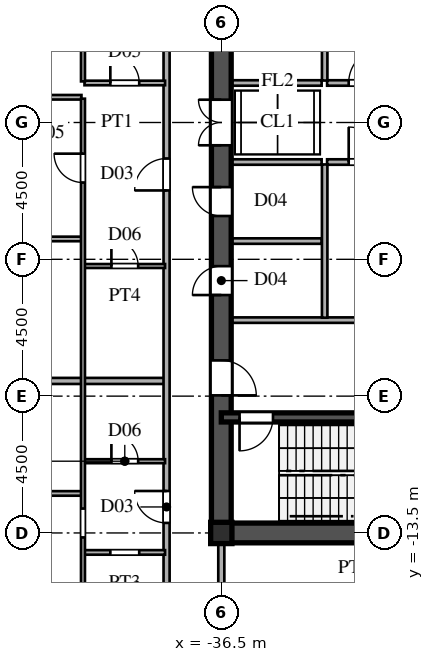
"""IFC4 building model, lengths in metres.
Left out: names, types, materials, properties, quantities, classifications, styles, units other than length and angle.
Written with IfcOpenShell. Run it as: python <this file> out.ifc"""

import sys

from ifc_helpers import new_model, si_unit, direction, frame, frame_2d, origin, origin_2d, place, context, subcontext, project, spatial, rectangle, i_section, extrude, source, transform, mapped, element, fill, save


model = new_model("IFC4")
c1 = context("Model", 3, precision=1e-05, world=origin(), true_north=direction((0.0, 1.0)))
c2 = subcontext(c1, "Body", "Model", "MODEL_VIEW")
j1 = project(units=[si_unit("LENGTHUNIT", "METRE"), si_unit("PLANEANGLEUNIT", "RADIAN")], contexts=[c1])
p1 = place(None, origin())
s1 = spatial("IfcSite", under=j1, at=p1, CompositionType="ELEMENT")
p2 = place(p1, origin())
s2 = spatial("IfcBuilding", under=s1, at=p2, CompositionType="ELEMENT")
p3 = place(p2, frame((0.0, 0.0, 114.0)))
s3 = spatial("IfcBuildingStorey", under=s2, at=p3, CompositionType="ELEMENT", Elevation=114.0)
m1 = source(origin(), c2, "Body", "SweptSolid", [
    extrude(i_section(OverallWidth=0.7, OverallDepth=0.7, WebThickness=0.028, FlangeThickness=0.045, at=origin_2d()), origin(), (0.0, 0.0, 1.0), 3.6),
])
p4 = place(p3, frame((-36.5, -13.5, 0.0), z_axis=(0.0, 0.0, 1.0), x_axis=(1.0, 0.0, 0.0)))
e1 = element("IfcColumn", 1, at=p4, inside=s3, PredefinedType="COLUMN", context=c2, shape_type="MappedRepresentation", body=[
    mapped(m1, transform((0.0, 0.0, 0.0), scale=1.0)),
])
p5 = place(p3, frame((-36.5, -13.5, 0.0), z_axis=(0.0, 0.0, 1.0), x_axis=(1.0, 0.0, 0.0)))
e2 = element("IfcWall", 2, at=p5, inside=s3, PredefinedType="SHEAR", context=c2, shape_type="SweptSolid", body=[
    extrude(rectangle(XDim=9.0, YDim=0.65, at=frame_2d((4.5, 0.0))), origin(), (0.0, 0.0, 1.0), 3.38),
])
p6 = place(p3, frame((-36.5, -13.65, 0.0), z_axis=(0.0, 0.0, 1.0), x_axis=(0.0, 1.0, 0.0)))
e3 = element("IfcWall", 3, at=p6, inside=s3, PredefinedType="SHEAR", context=c2, shape_type="SweptSolid", body=[
    extrude(rectangle(XDim=7.15, YDim=0.65, at=frame_2d((3.575, 0.0))), origin(), (0.0, 0.0, 1.0), 3.38),
])
p7 = place(p6, frame((4.675, 0.0, 0.0)))
e4 = element("IfcOpeningElement", 4, at=p7, cuts=e3, PredefinedType="OPENING", context=c2, shape_type="SweptSolid", body=[
    extrude(rectangle(XDim=1.15, YDim=2.2, at=frame_2d((0.575, 1.1))), frame((0.0, 0.335, 0.0), z_axis=(0.0, -1.0, 0.0), x_axis=(1.0, 0.0, 0.0)), (0.0, 0.0, 1.0), 0.67),
])
p8 = place(p3, frame((-36.5, -1.3, 0.0), z_axis=(0.0, 0.0, 1.0), x_axis=(0.0, 1.0, 0.0)))
e5 = element("IfcWall", 5, at=p8, inside=s3, PredefinedType="SHEAR", context=c2, shape_type="SweptSolid", body=[
    extrude(rectangle(XDim=2.6, YDim=0.65, at=frame_2d((1.3, 0.0))), origin(), (0.0, 0.0, 1.0), 3.38),
])
p9 = place(p8, frame((0.55, 0.0, 0.0)))
e6 = element("IfcOpeningElement", 6, at=p9, cuts=e5, PredefinedType="OPENING", context=c2, shape_type="SweptSolid", body=[
    extrude(rectangle(XDim=1.5, YDim=2.3, at=frame_2d((0.75, 1.15))), frame((0.0, 0.335, 0.0), z_axis=(0.0, -1.0, 0.0), x_axis=(1.0, 0.0, 0.0)), (0.0, 0.0, 1.0), 0.67),
])
p10 = place(p3, frame((-36.5, -6.5, 0.0), z_axis=(0.0, 0.0, 1.0), x_axis=(0.0, 1.0, 0.0)))
e7 = element("IfcWall", 7, at=p10, inside=s3, PredefinedType="SHEAR", context=c2, shape_type="SweptSolid", body=[
    extrude(rectangle(XDim=2.6, YDim=0.65, at=frame_2d((1.3, 0.0))), origin(), (0.0, 0.0, 1.0), 3.38),
])
p11 = place(p10, frame((0.825, 0.0, 0.0)))
e8 = element("IfcOpeningElement", 8, at=p11, cuts=e7, PredefinedType="OPENING", context=c2, shape_type="SweptSolid", body=[
    extrude(rectangle(XDim=0.95, YDim=2.15, at=frame_2d((0.475, 1.075))), frame((0.0, 0.335, 0.0), z_axis=(0.0, -1.0, 0.0), x_axis=(1.0, 0.0, 0.0)), (0.0, 0.0, 1.0), 0.67),
])
p12 = place(p3, frame((-36.5, -3.9, 0.0), z_axis=(0.0, 0.0, 1.0), x_axis=(0.0, 1.0, 0.0)))
e9 = element("IfcWall", 9, at=p12, inside=s3, PredefinedType="SHEAR", context=c2, shape_type="SweptSolid", body=[
    extrude(rectangle(XDim=2.6, YDim=0.65, at=frame_2d((1.3, 0.0))), origin(), (0.0, 0.0, 1.0), 3.38),
])
p13 = place(p12, frame((0.825, 0.0, 0.0)))
e10 = element("IfcOpeningElement", 10, at=p13, cuts=e9, PredefinedType="OPENING", context=c2, shape_type="SweptSolid", body=[
    extrude(rectangle(XDim=0.95, YDim=2.15, at=frame_2d((0.475, 1.075))), frame((0.0, 0.335, 0.0), z_axis=(0.0, -1.0, 0.0), x_axis=(1.0, 0.0, 0.0)), (0.0, 0.0, 1.0), 0.67),
])
p14 = place(p3, frame((-36.5, 1.3, 0.0), z_axis=(0.0, 0.0, 1.0), x_axis=(0.0, 1.0, 0.0)))
e11 = element("IfcWall", 11, at=p14, inside=s3, PredefinedType="SHEAR", context=c2, shape_type="SweptSolid", body=[
    extrude(rectangle(XDim=3.45, YDim=0.65, at=frame_2d((1.725, 0.0))), origin(), (0.0, 0.0, 1.0), 3.38),
])
p15 = place(p14, frame((1.25, 0.0, 0.0)))
e12 = element("IfcOpeningElement", 12, at=p15, cuts=e11, PredefinedType="OPENING", context=c2, shape_type="SweptSolid", body=[
    extrude(rectangle(XDim=0.95, YDim=2.15, at=frame_2d((0.475, 1.075))), frame((0.0, 0.335, 0.0), z_axis=(0.0, -1.0, 0.0), x_axis=(1.0, 0.0, 0.0)), (0.0, 0.0, 1.0), 0.67),
])
p16 = place(p3, frame((-36.5, -9.7, 0.0), z_axis=(0.0, 0.0, 1.0), x_axis=(1.0, 0.0, 0.0)))
e13 = element("IfcWall", 13, at=p16, inside=s3, PredefinedType="SHEAR", context=c2, shape_type="SweptSolid", body=[
    extrude(rectangle(XDim=9.0, YDim=0.3, at=frame_2d((4.5, 0.0))), origin(), (0.0, 0.0, 1.0), 3.38),
])
p17 = place(p16, frame((0.6, 0.0, 0.0)))
e14 = element("IfcOpeningElement", 14, at=p17, cuts=e13, PredefinedType="OPENING", context=c2, shape_type="SweptSolid", body=[
    extrude(rectangle(XDim=1.1, YDim=2.2, at=frame_2d((0.55, 1.1))), frame((0.0, 0.16, 0.0), z_axis=(0.0, -1.0, 0.0), x_axis=(1.0, 0.0, 0.0)), (0.0, 0.0, 1.0), 0.32),
])
p18 = place(p3, frame((-36.15, -6.5, 0.0), z_axis=(0.0, 0.0, 1.0), x_axis=(1.0, 0.0, 0.0)))
e15 = element("IfcWall", 15, at=p18, inside=s3, PredefinedType="PARTITIONING", context=c2, shape_type="SweptSolid", body=[
    extrude(rectangle(XDim=5.7, YDim=0.18, at=frame_2d((2.85, 0.0))), origin(), (0.0, 0.0, 1.0), 3.38),
])
p19 = place(p3, frame((-33.1, -6.42, 0.0), z_axis=(0.0, 0.0, 1.0), x_axis=(0.0, 1.0, 0.0)))
e16 = element("IfcWall", 16, at=p19, inside=s3, PredefinedType="PARTITIONING", context=c2, shape_type="SweptSolid", body=[
    extrude(rectangle(XDim=5.04, YDim=0.18, at=frame_2d((2.52, 0.0))), origin(), (0.0, 0.0, 1.0), 3.38),
])
p20 = place(p3, frame((-33.1, 1.38, 0.0), z_axis=(0.0, 0.0, 1.0), x_axis=(0.0, 1.0, 0.0)))
e17 = element("IfcWall", 17, at=p20, inside=s3, PredefinedType="PARTITIONING", context=c2, shape_type="SweptSolid", body=[
    extrude(rectangle(XDim=6.74, YDim=0.18, at=frame_2d((3.37, 0.0))), origin(), (0.0, 0.0, 1.0), 3.38),
])
p21 = place(p3, frame((-33.02, -1.3, 0.0), z_axis=(0.0, 0.0, 1.0), x_axis=(1.0, 0.0, 0.0)))
e18 = element("IfcWall", 18, at=p21, inside=s3, PredefinedType="PARTITIONING", context=c2, shape_type="SweptSolid", body=[
    extrude(rectangle(XDim=2.57, YDim=0.18, at=frame_2d((1.285, 0.0))), origin(), (0.0, 0.0, 1.0), 3.38),
])
p22 = place(p21, frame((0.71, 0.0, 0.0)))
e19 = element("IfcOpeningElement", 19, at=p22, cuts=e18, PredefinedType="OPENING", context=c2, shape_type="SweptSolid", body=[
    extrude(rectangle(XDim=1.15, YDim=2.2, at=frame_2d((0.575, 1.1))), frame((0.0, 0.1, 0.0), z_axis=(0.0, -1.0, 0.0), x_axis=(1.0, 0.0, 0.0)), (0.0, 0.0, 1.0), 0.2),
])
p23 = place(p3, frame((-33.02, 1.3, 0.0), z_axis=(0.0, 0.0, 1.0), x_axis=(1.0, 0.0, 0.0)))
e20 = element("IfcWall", 20, at=p23, inside=s3, PredefinedType="PARTITIONING", context=c2, shape_type="SweptSolid", body=[
    extrude(rectangle(XDim=2.57, YDim=0.18, at=frame_2d((1.285, 0.0))), origin(), (0.0, 0.0, 1.0), 3.38),
])
p24 = place(p23, frame((0.71, 0.0, 0.0)))
e21 = element("IfcOpeningElement", 21, at=p24, cuts=e20, PredefinedType="OPENING", context=c2, shape_type="SweptSolid", body=[
    extrude(rectangle(XDim=1.15, YDim=2.2, at=frame_2d((0.575, 1.1))), frame((0.0, 0.1, 0.0), z_axis=(0.0, -1.0, 0.0), x_axis=(1.0, 0.0, 0.0)), (0.0, 0.0, 1.0), 0.2),
])
for number, where, z_axis, x_axis in (
    (22, (-36.15, -1.3, 0.0), (0.0, 0.0, 1.0), (1.0, 0.0, 0.0)),
    (23, (-36.15, 1.3, 0.0), (0.0, 0.0, 1.0), (1.0, 0.0, 0.0)),
    (24, (-36.15, -3.9, 0.0), (0.0, 0.0, 1.0), (1.0, 0.0, 0.0)),
):
    element("IfcWall", number, at=place(p3, frame(where, z_axis=z_axis, x_axis=x_axis)), inside=s3, PredefinedType="PARTITIONING", context=c2, shape_type="SweptSolid", body=[
        extrude(rectangle(XDim=2.95, YDim=0.18, at=frame_2d((1.475, 0.0))), origin(), (0.0, 0.0, 1.0), 3.38),
    ])
p25 = place(p3, frame((-41.0, -14.14, 0.0), z_axis=(0.0, 0.0, 1.0), x_axis=(1.0, 0.0, 0.0)))
e25 = element("IfcWall", 25, at=p25, inside=s3, PredefinedType="PARTITIONING", context=c2, shape_type="SweptSolid", body=[
    extrude(rectangle(XDim=2.65, YDim=0.15, at=frame_2d((1.325, 0.0))), origin(), (0.0, 0.0, 1.0), 3.38),
])
p26 = place(p25, frame((0.85, 0.0, 0.0)))
e26 = element("IfcOpeningElement", 26, at=p26, cuts=e25, PredefinedType="OPENING", context=c2, shape_type="SweptSolid", body=[
    extrude(rectangle(XDim=0.95, YDim=2.15, at=frame_2d((0.475, 1.075))), frame((0.0, 0.085, 0.0), z_axis=(0.0, -1.0, 0.0), x_axis=(1.0, 0.0, 0.0)), (0.0, 0.0, 1.0), 0.17),
])
p27 = place(p3, frame((-54.45, -12.2, 0.0), z_axis=(0.0, 0.0, 1.0), x_axis=(1.0, 0.0, 0.0)))
e27 = element("IfcWall", 27, at=p27, inside=s3, PredefinedType="PARTITIONING", context=c2, shape_type="SweptSolid", body=[
    extrude(rectangle(XDim=13.35, YDim=0.15, at=frame_2d((6.675, 0.0))), origin(), (0.0, 0.0, 1.0), 3.38),
])
p28 = place(p27, frame((6.2, 0.0, 0.0)))
e28 = element("IfcOpeningElement", 28, at=p28, cuts=e27, PredefinedType="OPENING", context=c2, shape_type="SweptSolid", body=[
    extrude(rectangle(XDim=0.95, YDim=2.15, at=frame_2d((0.475, 1.075))), frame((0.0, 0.085, 0.0), z_axis=(0.0, -1.0, 0.0), x_axis=(1.0, 0.0, 0.0)), (0.0, 0.0, 1.0), 0.17),
])
p29 = place(p3, frame((-41.0, -11.14, 0.0), z_axis=(0.0, 0.0, 1.0), x_axis=(1.0, 0.0, 0.0)))
e29 = element("IfcWall", 29, at=p29, inside=s3, PredefinedType="PARTITIONING", context=c2, shape_type="SweptSolid", body=[
    extrude(rectangle(XDim=2.65, YDim=0.13, at=frame_2d((1.325, 0.0))), origin(), (0.0, 0.0, 1.0), 3.38),
])
p30 = place(p29, frame((0.885, 0.0, 0.0)))
e30 = element("IfcOpeningElement", 30, at=p30, cuts=e29, PredefinedType="OPENING", context=c2, shape_type="SweptSolid", body=[
    extrude(rectangle(XDim=0.88, YDim=2.1, at=frame_2d((0.44, 1.05))), frame((0.0, 0.075, 0.0), z_axis=(0.0, -1.0, 0.0), x_axis=(1.0, 0.0, 0.0)), (0.0, 0.0, 1.0), 0.15),
])
p31 = place(p3, frame((-62.69, -8.5, 0.0), z_axis=(0.0, 0.0, 1.0), x_axis=(1.0, 0.0, 0.0)))
e31 = element("IfcWall", 31, at=p31, inside=s3, PredefinedType="PARTITIONING", context=c2, shape_type="SweptSolid", body=[
    extrude(rectangle(XDim=24.31, YDim=0.2, at=frame_2d((12.155, 0.0))), origin(), (0.0, 0.0, 1.0), 3.38),
])
p32 = place(p3, frame((-41.0, -4.72, 0.0), z_axis=(0.0, 0.0, 1.0), x_axis=(1.0, 0.0, 0.0)))
e32 = element("IfcWall", 32, at=p32, inside=s3, PredefinedType="PARTITIONING", context=c2, shape_type="SweptSolid", body=[
    extrude(rectangle(XDim=2.65, YDim=0.13, at=frame_2d((1.325, 0.0))), origin(), (0.0, 0.0, 1.0), 3.38),
])
p33 = place(p32, frame((0.885, 0.0, 0.0)))
e33 = element("IfcOpeningElement", 33, at=p33, cuts=e32, PredefinedType="OPENING", context=c2, shape_type="SweptSolid", body=[
    extrude(rectangle(XDim=0.88, YDim=2.1, at=frame_2d((0.44, 1.05))), frame((0.0, 0.075, 0.0), z_axis=(0.0, -1.0, 0.0), x_axis=(1.0, 0.0, 0.0)), (0.0, 0.0, 1.0), 0.15),
])
p34 = place(p3, frame((-69.535, -3.83, 0.0), z_axis=(0.0, 0.0, 1.0), x_axis=(1.0, 0.0, 0.0)))
e34 = element("IfcWall", 34, at=p34, inside=s3, PredefinedType="PARTITIONING", context=c2, shape_type="SweptSolid", body=[
    extrude(rectangle(XDim=28.435, YDim=0.15, at=frame_2d((14.217, 0.0))), origin(), (0.0, 0.0, 1.0), 3.38),
])
p35 = place(p34, frame((24.647, 0.0, 0.0)))
e35 = element("IfcOpeningElement", 35, at=p35, cuts=e34, PredefinedType="OPENING", context=c2, shape_type="SweptSolid", body=[
    extrude(rectangle(XDim=0.95, YDim=2.15, at=frame_2d((0.475, 1.075))), frame((0.0, 0.085, 0.0), z_axis=(0.0, -1.0, 0.0), x_axis=(1.0, 0.0, 0.0)), (0.0, 0.0, 1.0), 0.17),
])
p36 = place(p34, frame((11.71, 0.0, 0.0)))
e36 = element("IfcOpeningElement", 36, at=p36, cuts=e34, PredefinedType="OPENING", context=c2, shape_type="SweptSolid", body=[
    extrude(rectangle(XDim=0.95, YDim=2.15, at=frame_2d((0.475, 1.075))), frame((0.0, 0.085, 0.0), z_axis=(0.0, -1.0, 0.0), x_axis=(1.0, 0.0, 0.0)), (0.0, 0.0, 1.0), 0.17),
])
p37 = place(p3, frame((-69.535, 0.83, 0.0), z_axis=(0.0, 0.0, 1.0), x_axis=(1.0, 0.0, 0.0)))
e37 = element("IfcWall", 37, at=p37, inside=s3, PredefinedType="PARTITIONING", context=c2, shape_type="SweptSolid", body=[
    extrude(rectangle(XDim=28.435, YDim=0.15, at=frame_2d((14.217, 0.0))), origin(), (0.0, 0.0, 1.0), 3.38),
])
p38 = place(p37, frame((24.647, 0.0, 0.0)))
e38 = element("IfcOpeningElement", 38, at=p38, cuts=e37, PredefinedType="OPENING", context=c2, shape_type="SweptSolid", body=[
    extrude(rectangle(XDim=0.95, YDim=2.15, at=frame_2d((0.475, 1.075))), frame((0.0, 0.085, 0.0), z_axis=(0.0, -1.0, 0.0), x_axis=(1.0, 0.0, 0.0)), (0.0, 0.0, 1.0), 0.17),
])
p39 = place(p37, frame((11.71, 0.0, 0.0)))
e39 = element("IfcOpeningElement", 39, at=p39, cuts=e37, PredefinedType="OPENING", context=c2, shape_type="SweptSolid", body=[
    extrude(rectangle(XDim=0.95, YDim=2.15, at=frame_2d((0.475, 1.075))), frame((0.0, 0.085, 0.0), z_axis=(0.0, -1.0, 0.0), x_axis=(1.0, 0.0, 0.0)), (0.0, 0.0, 1.0), 0.17),
])
p40 = place(p3, frame((-41.0, 1.3, 0.0), z_axis=(0.0, 0.0, 1.0), x_axis=(1.0, 0.0, 0.0)))
e40 = element("IfcWall", 40, at=p40, inside=s3, PredefinedType="PARTITIONING", context=c2, shape_type="SweptSolid", body=[
    extrude(rectangle(XDim=2.65, YDim=0.15, at=frame_2d((1.325, 0.0))), origin(), (0.0, 0.0, 1.0), 3.38),
])
p41 = place(p40, frame((0.85, 0.0, 0.0)))
e41 = element("IfcOpeningElement", 41, at=p41, cuts=e40, PredefinedType="OPENING", context=c2, shape_type="SweptSolid", body=[
    extrude(rectangle(XDim=0.95, YDim=2.15, at=frame_2d((0.475, 1.075))), frame((0.0, 0.085, 0.0), z_axis=(0.0, -1.0, 0.0), x_axis=(1.0, 0.0, 0.0)), (0.0, 0.0, 1.0), 0.17),
])
p42 = place(p3, frame((-41.05, -19.634, 0.0), z_axis=(0.0, 0.0, 1.0), x_axis=(0.0, 1.0, 0.0)))
e42 = element("IfcWall", 42, at=p42, inside=s3, PredefinedType="PARTITIONING", context=c2, shape_type="SweptSolid", body=[
    extrude(rectangle(XDim=20.417, YDim=0.13, at=frame_2d((10.208, 0.0))), origin(), (0.0, 0.0, 1.0), 2.99),
])
p43 = place(p42, frame((5.987, 0.0, 0.0)))
e43 = element("IfcOpeningElement", 43, at=p43, cuts=e42, PredefinedType="OPENING", context=c2, shape_type="SweptSolid", body=[
    extrude(rectangle(XDim=0.95, YDim=2.15, at=frame_2d((0.475, 1.075))), frame((0.0, 0.075, 0.0), z_axis=(0.0, -1.0, 0.0), x_axis=(1.0, 0.0, 0.0)), (0.0, 0.0, 1.0), 0.15),
])
p44 = place(p42, frame((17.659, 0.0, 0.0)))
e44 = element("IfcOpeningElement", 44, at=p44, cuts=e42, PredefinedType="OPENING", context=c2, shape_type="SweptSolid", body=[
    extrude(rectangle(XDim=0.95, YDim=2.15, at=frame_2d((0.475, 1.075))), frame((0.0, 0.075, 0.0), z_axis=(0.0, -1.0, 0.0), x_axis=(1.0, 0.0, 0.0)), (0.0, 0.0, 1.0), 0.15),
])
p45 = place(p3, frame((-41.05, 1.352, 0.0), z_axis=(0.0, 0.0, 1.0), x_axis=(0.0, 1.0, 0.0)))
e45 = element("IfcWall", 45, at=p45, inside=s3, PredefinedType="PARTITIONING", context=c2, shape_type="SweptSolid", body=[
    extrude(rectangle(XDim=18.282, YDim=0.13, at=frame_2d((9.141, 0.0))), origin(), (0.0, 0.0, 1.0), 2.99),
])
p46 = place(p45, frame((9.312, 0.0, 0.0)))
e46 = element("IfcOpeningElement", 46, at=p46, cuts=e45, PredefinedType="OPENING", context=c2, shape_type="SweptSolid", body=[
    extrude(rectangle(XDim=0.95, YDim=2.15, at=frame_2d((0.475, 1.075))), frame((0.0, 0.075, 0.0), z_axis=(0.0, -1.0, 0.0), x_axis=(1.0, 0.0, 0.0)), (0.0, 0.0, 1.0), 0.15),
])
p47 = place(p3, frame((-38.3, -15.515, 0.0), z_axis=(0.0, 0.0, 1.0), x_axis=(0.0, 1.0, 0.0)))
e47 = element("IfcWall", 47, at=p47, inside=s3, PredefinedType="PARTITIONING", context=c2, shape_type="SweptSolid", body=[
    extrude(rectangle(XDim=31.03, YDim=0.2, at=frame_2d((15.515, 0.0))), origin(), (0.0, 0.0, 1.0), 3.38),
])
p48 = place(p47, frame((2.345, 0.0, 0.0)))
e48 = element("IfcOpeningElement", 48, at=p48, cuts=e47, PredefinedType="OPENING", context=c2, shape_type="SweptSolid", body=[
    extrude(rectangle(XDim=1.05, YDim=2.25, at=frame_2d((0.525, 1.125))), frame((0.0, 0.11, 0.0), z_axis=(0.0, -1.0, 0.0), x_axis=(1.0, 0.0, 0.0)), (0.0, 0.0, 1.0), 0.22),
])
p49 = place(p47, frame((13.28, 0.0, 0.0)))
e49 = element("IfcOpeningElement", 49, at=p49, cuts=e47, PredefinedType="OPENING", context=c2, shape_type="SweptSolid", body=[
    extrude(rectangle(XDim=1.05, YDim=2.25, at=frame_2d((0.525, 1.125))), frame((0.0, 0.11, 0.0), z_axis=(0.0, -1.0, 0.0), x_axis=(1.0, 0.0, 0.0)), (0.0, 0.0, 1.0), 0.22),
])
p50 = place(p47, frame((25.567, 0.0, 0.0)))
e50 = element("IfcOpeningElement", 50, at=p50, cuts=e47, PredefinedType="OPENING", context=c2, shape_type="SweptSolid", body=[
    extrude(rectangle(XDim=1.05, YDim=2.25, at=frame_2d((0.525, 1.125))), frame((0.0, 0.11, 0.0), z_axis=(0.0, -1.0, 0.0), x_axis=(1.0, 0.0, 0.0)), (0.0, 0.0, 1.0), 0.22),
])
p51 = place(p3, frame((-36.5, -15.515, 0.0), z_axis=(0.0, 0.0, 1.0), x_axis=(0.0, 1.0, 0.0)))
e51 = element("IfcWall", 51, at=p51, inside=s3, PredefinedType="PARTITIONING", context=c2, shape_type="SweptSolid", body=[
    extrude(rectangle(XDim=1.685, YDim=0.2, at=frame_2d((0.842, 0.0))), origin(), (0.0, 0.0, 1.0), 2.78),
])
m2 = source(origin(), c2, "Body", "SweptSolid", [
    extrude(rectangle(XDim=1.15, YDim=2.2, at=frame_2d((0.575, 1.1))), frame((0.0, 0.025, 0.0), z_axis=(0.0, -1.0, 0.0), x_axis=(1.0, 0.0, 0.0)), (0.0, 0.0, 1.0), 0.05),
])
p52 = place(p7, frame((1.15, 0.0, 0.0), z_axis=(0.0, 0.0, 1.0), x_axis=(-1.0, 0.0, 0.0)))
e52 = element("IfcDoor", 52, at=p52, inside=s3, OperationType="SINGLE_SWING_LEFT", PredefinedType="DOOR", context=c2, shape_type="MappedRepresentation", body=[
    mapped(m2, transform((0.0, 0.0, 0.0), scale=1.0)),
])
fill(e4, e52)
m3 = source(origin(), c2, "Body", "SweptSolid", [
    extrude(rectangle(XDim=1.5, YDim=2.3, at=frame_2d((0.75, 1.15))), frame((0.0, 0.025, 0.0), z_axis=(0.0, -1.0, 0.0), x_axis=(1.0, 0.0, 0.0)), (0.0, 0.0, 1.0), 0.05),
])
p53 = place(p9, origin())
e53 = element("IfcDoor", 53, at=p53, inside=s3, OperationType="DOUBLE_SWING_LEFT", PredefinedType="DOOR", context=c2, shape_type="MappedRepresentation", body=[
    mapped(m3, transform((0.0, 0.0, 0.0), scale=1.0)),
])
fill(e6, e53)
m4 = source(origin(), c2, "Body", "SweptSolid", [
    extrude(rectangle(XDim=0.95, YDim=2.15, at=frame_2d((0.475, 1.075))), frame((0.0, 0.025, 0.0), z_axis=(0.0, -1.0, 0.0), x_axis=(1.0, 0.0, 0.0)), (0.0, 0.0, 1.0), 0.05),
])
p54 = place(p11, origin())
e54 = element("IfcDoor", 54, at=p54, inside=s3, OperationType="SINGLE_SWING_LEFT", PredefinedType="DOOR", context=c2, shape_type="MappedRepresentation", body=[
    mapped(m4, transform((0.0, 0.0, 0.0), scale=1.0)),
])
fill(e8, e54)
p55 = place(p13, origin())
e55 = element("IfcDoor", 55, at=p55, inside=s3, OperationType="SINGLE_SWING_RIGHT", PredefinedType="DOOR", context=c2, shape_type="MappedRepresentation", body=[
    mapped(m4, transform((0.0, 0.0, 0.0), scale=1.0)),
])
fill(e10, e55)
m5 = source(origin(), c2, "Body", "SweptSolid", [
    extrude(rectangle(XDim=1.1, YDim=2.2, at=frame_2d((0.55, 1.1))), frame((0.0, 0.025, 0.0), z_axis=(0.0, -1.0, 0.0), x_axis=(1.0, 0.0, 0.0)), (0.0, 0.0, 1.0), 0.05),
])
p56 = place(p17, frame((1.1, 0.0, 0.0), z_axis=(0.0, 0.0, 1.0), x_axis=(-1.0, 0.0, 0.0)))
e56 = element("IfcDoor", 56, at=p56, inside=s3, OperationType="SINGLE_SWING_LEFT", PredefinedType="DOOR", context=c2, shape_type="MappedRepresentation", body=[
    mapped(m5, transform((0.0, 0.0, 0.0), scale=1.0)),
])
fill(e14, e56)
p57 = place(p22, origin())
e57 = element("IfcDoor", 57, at=p57, inside=s3, OperationType="SINGLE_SWING_LEFT", PredefinedType="DOOR", context=c2, shape_type="MappedRepresentation", body=[
    mapped(m2, transform((0.0, 0.0, 0.0), scale=1.0)),
])
fill(e19, e57)
p58 = place(p24, origin())
e58 = element("IfcDoor", 58, at=p58, inside=s3, OperationType="SINGLE_SWING_RIGHT", PredefinedType="DOOR", context=c2, shape_type="MappedRepresentation", body=[
    mapped(m2, transform((0.0, 0.0, 0.0), scale=1.0)),
])
fill(e21, e58)
m6 = source(origin(), c2, "Body", "SweptSolid", [
    extrude(rectangle(XDim=0.88, YDim=2.1, at=frame_2d((0.44, 1.05))), frame((0.0, 0.025, 0.0), z_axis=(0.0, -1.0, 0.0), x_axis=(1.0, 0.0, 0.0)), (0.0, 0.0, 1.0), 0.05),
])
p59 = place(p30, origin())
e59 = element("IfcDoor", 59, at=p59, inside=s3, OperationType="SINGLE_SWING_LEFT", PredefinedType="DOOR", context=c2, shape_type="MappedRepresentation", body=[
    mapped(m6, transform((0.0, 0.0, 0.0), scale=1.0)),
])
fill(e30, e59)
p60 = place(p33, origin())
e60 = element("IfcDoor", 60, at=p60, inside=s3, OperationType="SINGLE_SWING_LEFT", PredefinedType="DOOR", context=c2, shape_type="MappedRepresentation", body=[
    mapped(m6, transform((0.0, 0.0, 0.0), scale=1.0)),
])
fill(e33, e60)
m7 = source(origin(), c2, "Body", "SweptSolid", [
    extrude(rectangle(XDim=0.95, YDim=2.15, at=frame_2d((0.475, 1.075))), frame((0.0, 0.025, 0.0), z_axis=(0.0, -1.0, 0.0), x_axis=(1.0, 0.0, 0.0)), (0.0, 0.0, 1.0), 0.05),
])
p61 = place(p41, origin())
e61 = element("IfcDoor", 61, at=p61, inside=s3, OperationType="SINGLE_SWING_LEFT", PredefinedType="DOOR", context=c2, shape_type="MappedRepresentation", body=[
    mapped(m7, transform((0.0, 0.0, 0.0), scale=1.0)),
])
fill(e41, e61)
p62 = place(p44, origin())
e62 = element("IfcDoor", 62, at=p62, inside=s3, OperationType="SINGLE_SWING_RIGHT", PredefinedType="DOOR", context=c2, shape_type="MappedRepresentation", body=[
    mapped(m7, transform((0.0, 0.0, 0.0), scale=1.0)),
])
fill(e44, e62)
m8 = source(origin(), c2, "Body", "SweptSolid", [
    extrude(rectangle(XDim=1.05, YDim=2.25, at=frame_2d((0.525, 1.125))), frame((0.0, 0.025, 0.0), z_axis=(0.0, -1.0, 0.0), x_axis=(1.0, 0.0, 0.0)), (0.0, 0.0, 1.0), 0.05),
])
p63 = place(p48, origin())
e63 = element("IfcDoor", 63, at=p63, inside=s3, OperationType="SINGLE_SWING_RIGHT", PredefinedType="DOOR", context=c2, shape_type="MappedRepresentation", body=[
    mapped(m8, transform((0.0, 0.0, 0.0), scale=1.0)),
])
fill(e48, e63)
p64 = place(p49, origin())
e64 = element("IfcDoor", 64, at=p64, inside=s3, OperationType="SINGLE_SWING_LEFT", PredefinedType="DOOR", context=c2, shape_type="MappedRepresentation", body=[
    mapped(m8, transform((0.0, 0.0, 0.0), scale=1.0)),
])
fill(e49, e64)
save(model, sys.argv[1])
